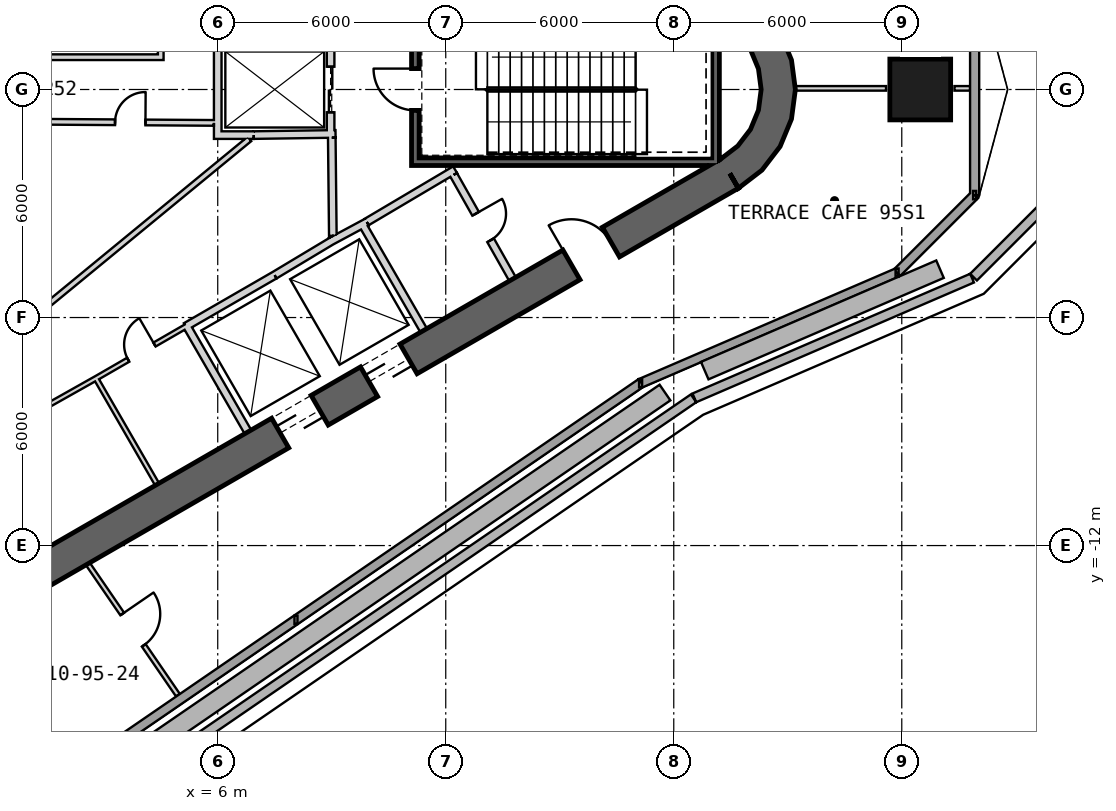
"""IFC4 building model, lengths in metres.
Left out: names, types, materials, properties, quantities, classifications, styles, units other than length and angle.
Written with IfcOpenShell. Run it as: python <this file> out.ifc"""

import sys

from ifc_helpers import new_model, si_unit, direction, frame, frame_2d, origin, origin_2d, place, context, subcontext, project, spatial, polyline, rectangle, outline, extrude, element, fill, save


model = new_model("IFC4")
c1 = context("Model", 3, precision=1e-05, world=origin(), true_north=direction((0.0, 1.0)))
c2 = subcontext(c1, "Body", "Model", "MODEL_VIEW")
j1 = project(units=[si_unit("LENGTHUNIT", "METRE"), si_unit("PLANEANGLEUNIT", "RADIAN")], contexts=[c1])
p1 = place(None, origin())
s1 = spatial("IfcSite", under=j1, at=p1, CompositionType="ELEMENT")
p2 = place(p1, origin())
s2 = spatial("IfcBuilding", under=s1, at=p2, CompositionType="ELEMENT")
p3 = place(p2, frame((0.0, 0.0, 420.3)))
s3 = spatial("IfcBuildingStorey", under=s2, at=p3, CompositionType="ELEMENT", Elevation=420.3)
p4 = place(p3, frame((24.486, 0.0, -0.25), z_axis=(0.0, 0.0, 1.0), x_axis=(1.0, 0.0, 0.0)))
e1 = element("IfcColumn", 1, at=p4, inside=s3, PredefinedType="COLUMN", context=c2, shape_type="SweptSolid", body=[
    extrude(rectangle(XDim=1.6, YDim=1.6, at=origin_2d()), origin(), (0.0, 0.0, 1.0), 5.0),
])
p5 = place(p3, frame((-7.825, -17.97, 0.0), z_axis=(0.0, 0.0, 1.0), x_axis=(0.866028369851, 0.499994862586, 0.0)))
e2 = element("IfcWall", 2, at=p5, inside=s3, PredefinedType="SHEAR", context=c2, shape_type="SweptSolid", body=[
    extrude(rectangle(XDim=31.523, YDim=0.9, at=frame_2d((15.762, 0.0))), origin(), (0.0, 0.0, 1.0), 5.0),
])
p6 = place(p5, frame((17.862, 0.0, 0.0)))
e3 = element("IfcOpeningElement", 3, at=p6, cuts=e2, PredefinedType="OPENING", context=c2, shape_type="SweptSolid", body=[
    extrude(rectangle(XDim=1.2, YDim=2.4, at=frame_2d((0.6, 1.2))), frame((0.0, 0.46, 0.0), z_axis=(0.0, -1.0, 0.0), x_axis=(1.0, 0.0, 0.0)), (0.0, 0.0, 1.0), 0.92),
])
p7 = place(p5, frame((20.562, 0.0, 0.0)))
e4 = element("IfcOpeningElement", 4, at=p7, cuts=e2, PredefinedType="OPENING", context=c2, shape_type="SweptSolid", body=[
    extrude(rectangle(XDim=1.2, YDim=2.4, at=frame_2d((0.6, 1.2))), frame((0.0, 0.46, 0.0), z_axis=(0.0, -1.0, 0.0), x_axis=(1.0, 0.0, 0.0)), (0.0, 0.0, 1.0), 0.92),
])
p8 = place(p5, frame((26.712, 0.0, 0.0)))
e5 = element("IfcOpeningElement", 5, at=p8, cuts=e2, PredefinedType="OPENING", context=c2, shape_type="SweptSolid", body=[
    extrude(rectangle(XDim=1.2, YDim=2.4, at=frame_2d((0.6, 1.2))), frame((0.0, 0.46, 0.0), z_axis=(0.0, -1.0, 0.0), x_axis=(1.0, 0.0, 0.0)), (0.0, 0.0, 1.0), 0.92),
])
p9 = place(p5, frame((3.612, 0.0, 0.0)))
e6 = element("IfcOpeningElement", 6, at=p9, cuts=e2, PredefinedType="OPENING", context=c2, shape_type="SweptSolid", body=[
    extrude(rectangle(XDim=1.2, YDim=2.4, at=frame_2d((0.6, 1.2))), frame((0.0, 0.46, 0.0), z_axis=(0.0, -1.0, 0.0), x_axis=(1.0, 0.0, 0.0)), (0.0, 0.0, 1.0), 0.92),
])
p10 = place(p3, origin())
e7 = element("IfcWall", 7, at=p10, inside=s3, PredefinedType="SHEAR", context=c2, shape_type="SweptSolid", body=[
    extrude(outline(polyline([(19.7, -2.598), (20.321, -2.121), (20.798, -1.5), (21.098, -0.777), (21.2, 0.0), (21.098, 0.777), (20.798, 1.5), (20.321, 2.121), (19.7, 2.598), (19.25, 1.819), (19.685, 1.485), (20.019, 1.05), (20.229, 0.543), (20.3, 0.0), (20.229, -0.543), (20.019, -1.05), (19.685, -1.485), (19.25, -1.819), (19.7, -2.598)])), origin(), (0.0, 0.0, 1.0), 5.0),
])
p11 = place(p3, frame((-1.01, -20.178, 0.0), z_axis=(0.0, 0.0, 1.0), x_axis=(0.824477208683, 0.565895160221, 0.0)))
e8 = element("IfcWall", 8, at=p11, inside=s3, PredefinedType="SOLIDWALL", context=c2, shape_type="SweptSolid", body=[
    extrude(rectangle(XDim=21.999, YDim=0.24, at=frame_2d((11.0, 0.0))), origin(), (0.0, 0.0, 1.0), 4.75),
])
p12 = place(p3, frame((17.127, -7.729, 0.0), z_axis=(0.0, 0.0, 1.0), x_axis=(0.918306180975, 0.395870885497, 0.0)))
e9 = element("IfcWall", 9, at=p12, inside=s3, PredefinedType="SOLIDWALL", context=c2, shape_type="SweptSolid", body=[
    extrude(rectangle(XDim=7.349, YDim=0.24, at=frame_2d((3.675, 0.0))), origin(), (0.0, 0.0, 1.0), 4.75),
])
p13 = place(p3, frame((23.876, -4.82, 0.0), z_axis=(0.0, 0.0, 1.0), x_axis=(0.707106781187, 0.707106781187, 0.0)))
e10 = element("IfcWall", 10, at=p13, inside=s3, PredefinedType="SOLIDWALL", context=c2, shape_type="SweptSolid", body=[
    extrude(rectangle(XDim=2.886, YDim=0.24, at=frame_2d((1.443, 0.0))), origin(), (0.0, 0.0, 1.0), 4.75),
])
p14 = place(p3, frame((25.917, -2.779, 0.0), z_axis=(0.0, 0.0, 1.0), x_axis=(0.0, 1.0, 0.0)))
e11 = element("IfcWall", 11, at=p14, inside=s3, PredefinedType="SOLIDWALL", context=c2, shape_type="SweptSolid", body=[
    extrude(rectangle(XDim=5.558, YDim=0.24, at=frame_2d((2.779, 0.0))), origin(), (0.0, 0.0, 1.0), 4.75),
])
p15 = place(p3, frame((27.958, -2.868, 0.04), z_axis=(0.0, 0.0, 1.0), x_axis=(-0.707106781187, -0.707106781187, 0.0)))
e12 = element("IfcWall", 12, at=p15, inside=s3, PredefinedType="PARAPET", context=c2, shape_type="SweptSolid", body=[
    extrude(rectangle(XDim=2.926, YDim=0.25, at=frame_2d((1.463, 0.0))), origin(), (0.0, 0.0, 1.0), 1.2),
])
p16 = place(p3, frame((25.85, -4.964, 0.04), z_axis=(0.0, 0.0, 1.0), x_axis=(-0.918309857205, -0.395862357594, 0.0)))
e13 = element("IfcWall", 13, at=p16, inside=s3, PredefinedType="PARAPET", context=c2, shape_type="SweptSolid", body=[
    extrude(rectangle(XDim=7.958, YDim=0.25, at=frame_2d((3.979, 0.0))), origin(), (0.0, 0.0, 1.0), 1.2),
])
p17 = place(p3, frame((18.521, -8.125, 0.04), z_axis=(0.0, 0.0, 1.0), x_axis=(-0.82448023265, -0.565890754447, 0.0)))
e14 = element("IfcWall", 14, at=p17, inside=s3, PredefinedType="PARAPET", context=c2, shape_type="SweptSolid", body=[
    extrude(rectangle(XDim=24.007, YDim=0.25, at=frame_2d((12.003, 0.0))), origin(), (0.0, 0.0, 1.0), 1.2),
])
p18 = place(p3, frame((25.006, -4.728, 0.04), z_axis=(0.0, 0.0, 1.0), x_axis=(-0.918311377088, -0.395858831795, 0.0)))
e15 = element("IfcWall", 15, at=p18, inside=s3, PredefinedType="PARAPET", context=c2, shape_type="SweptSolid", body=[
    extrude(rectangle(XDim=6.742, YDim=0.5, at=frame_2d((3.371, 0.0))), origin(), (0.0, 0.0, 1.0), 0.6),
])
p19 = place(p3, frame((17.769, -7.974, 0.04), z_axis=(0.0, 0.0, 1.0), x_axis=(-0.824477548628, -0.565894664941, 0.0)))
e16 = element("IfcWall", 16, at=p19, inside=s3, PredefinedType="PARAPET", context=c2, shape_type="SweptSolid", body=[
    extrude(rectangle(XDim=22.831, YDim=0.5, at=frame_2d((11.416, 0.0))), origin(), (0.0, 0.0, 1.0), 0.6),
])
p20 = place(p3, frame((6.795, -9.01, 0.0), z_axis=(0.0, 0.0, 1.0), x_axis=(-0.499984717929, 0.866034226713, 0.0)))
e17 = element("IfcWall", 17, at=p20, inside=s3, PredefinedType="PLUMBINGWALL", context=c2, shape_type="SweptSolid", body=[
    extrude(rectangle(XDim=3.25, YDim=0.2, at=frame_2d((1.625, 0.0))), origin(), (0.0, 0.0, 1.0), 4.75),
])
p21 = place(p3, frame((5.159, -6.236, 0.0), z_axis=(0.0, 0.0, 1.0), x_axis=(0.866036505625, 0.499980770555, 0.0)))
e18 = element("IfcWall", 18, at=p21, inside=s3, PredefinedType="PLUMBINGWALL", context=c2, shape_type="SweptSolid", body=[
    extrude(rectangle(XDim=2.7, YDim=0.2, at=frame_2d((1.35, 0.0))), origin(), (0.0, 0.0, 1.0), 4.75),
])
p22 = place(p3, frame((9.795, -3.525, 0.0), z_axis=(0.0, 0.0, 1.0), x_axis=(0.499984717929, -0.866034226713, 0.0)))
e19 = element("IfcWall", 19, at=p22, inside=s3, PredefinedType="PLUMBINGWALL", context=c2, shape_type="SweptSolid", body=[
    extrude(rectangle(XDim=3.25, YDim=0.2, at=frame_2d((1.625, 0.0))), origin(), (0.0, 0.0, 1.0), 4.75),
])
p23 = place(p3, frame((8.974, -3.999, 0.0), z_axis=(0.0, 0.0, 1.0), x_axis=(0.880907015104, 0.473289373154, 0.0)))
e20 = element("IfcWall", 20, at=p23, inside=s3, PredefinedType="PLUMBINGWALL", context=c2, shape_type="SweptSolid", body=[
    extrude(rectangle(XDim=1.078, YDim=0.2, at=frame_2d((0.539, 0.0))), origin(), (0.0, 0.0, 1.0), 4.75),
])
p24 = place(p3, frame((7.497, -4.886, 0.0), z_axis=(0.0, 0.0, 1.0), x_axis=(0.857516281273, 0.51445682749, 0.0)))
e21 = element("IfcWall", 21, at=p24, inside=s3, PredefinedType="PLUMBINGWALL", context=c2, shape_type="SweptSolid", body=[
    extrude(rectangle(XDim=1.845, YDim=0.2, at=frame_2d((0.922, 0.0))), origin(), (0.0, 0.0, 1.0), 4.75),
])
p25 = place(p3, frame((19.1, -2.0, -0.25), z_axis=(0.0, 0.0, 1.0), x_axis=(0.0, 1.0, 0.0)))
e22 = element("IfcWall", 22, at=p25, inside=s3, PredefinedType="SHEAR", context=c2, shape_type="SweptSolid", body=[
    extrude(rectangle(XDim=3.8, YDim=0.2, at=frame_2d((1.9, 0.0))), origin(), (0.0, 0.0, 1.0), 5.0),
])
p26 = place(p3, frame((11.1, -1.9, -0.25), z_axis=(0.0, 0.0, 1.0), x_axis=(1.0, 0.0, 0.0)))
e23 = element("IfcWall", 23, at=p26, inside=s3, PredefinedType="SHEAR", context=c2, shape_type="SweptSolid", body=[
    extrude(rectangle(XDim=7.9, YDim=0.2, at=frame_2d((3.95, 0.0))), origin(), (0.0, 0.0, 1.0), 5.0),
])
p27 = place(p3, frame((11.2, -1.8, -0.25), z_axis=(0.0, 0.0, 1.0), x_axis=(0.0, 1.0, 0.0)))
e24 = element("IfcWall", 24, at=p27, inside=s3, PredefinedType="SHEAR", context=c2, shape_type="SweptSolid", body=[
    extrude(rectangle(XDim=3.6, YDim=0.2, at=frame_2d((1.8, 0.0))), origin(), (0.0, 0.0, 1.0), 5.0),
])
p28 = place(p27, frame((1.25, 0.0, 0.25)))
e25 = element("IfcOpeningElement", 25, at=p28, cuts=e24, PredefinedType="OPENING", context=c2, shape_type="SweptSolid", body=[
    extrude(rectangle(XDim=1.1, YDim=2.1, at=frame_2d((0.55, 1.05))), frame((0.0, 0.11, 0.0), z_axis=(0.0, -1.0, 0.0), x_axis=(1.0, 0.0, 0.0)), (0.0, 0.0, 1.0), 0.22),
])
p29 = place(p3, frame((8.97, 1.2, 0.0), z_axis=(0.0, 0.0, 1.0), x_axis=(0.0, -1.0, 0.0)))
e26 = element("IfcWall", 26, at=p29, inside=s3, PredefinedType="PLUMBINGWALL", context=c2, shape_type="SweptSolid", body=[
    extrude(rectangle(XDim=2.4, YDim=0.2, at=frame_2d((1.2, 0.0))), origin(), (0.0, 0.0, 1.0), 4.75),
])
p30 = place(p29, frame((0.6, 0.0, 0.0)))
e27 = element("IfcOpeningElement", 27, at=p30, cuts=e26, PredefinedType="OPENING", context=c2, shape_type="SweptSolid", body=[
    extrude(rectangle(XDim=1.2, YDim=2.4, at=frame_2d((0.6, 1.2))), frame((0.0, 0.11, 0.0), z_axis=(0.0, -1.0, 0.0), x_axis=(1.0, 0.0, 0.0)), (0.0, 0.0, 1.0), 0.22),
])
p31 = place(p3, frame((6.949, -1.2, 0.0), z_axis=(0.0, 0.0, 1.0), x_axis=(-1.0, 0.0, 0.0)))
e28 = element("IfcWall", 28, at=p31, inside=s3, PredefinedType="PLUMBINGWALL", context=c2, shape_type="SweptSolid", body=[
    extrude(rectangle(XDim=1.049, YDim=0.2, at=frame_2d((0.524, 0.0))), origin(), (0.0, 0.0, 1.0), 4.75),
])
p32 = place(p3, frame((6.0, -1.1, 0.0), z_axis=(0.0, 0.0, 1.0), x_axis=(0.0, 1.0, 0.0)))
e29 = element("IfcWall", 29, at=p32, inside=s3, PredefinedType="PLUMBINGWALL", context=c2, shape_type="SweptSolid", body=[
    extrude(rectangle(XDim=2.4, YDim=0.2, at=frame_2d((1.2, 0.0))), origin(), (0.0, 0.0, 1.0), 4.75),
])
p33 = place(p3, frame((9.1, -1.168, 0.0), z_axis=(0.0, 0.0, 1.0), x_axis=(-0.999896137355, -0.014412303875, 0.0)))
e30 = element("IfcWall", 30, at=p33, inside=s3, PredefinedType="PLUMBINGWALL", context=c2, shape_type="SweptSolid", body=[
    extrude(rectangle(XDim=2.151, YDim=0.2, at=frame_2d((1.076, 0.0))), origin(), (0.0, 0.0, 1.0), 4.75),
])
p34 = place(p3, frame((4.405, -10.389, 0.0), z_axis=(0.0, 0.0, 1.0), x_axis=(-0.500017246033, 0.866015446554, 0.0)))
e31 = element("IfcWall", 31, at=p34, inside=s3, PredefinedType="PARTITIONING", context=c2, shape_type="SweptSolid", body=[
    extrude(rectangle(XDim=3.25, YDim=0.12, at=frame_2d((1.625, 0.0))), origin(), (0.0, 0.0, 1.0), 4.75),
])
p35 = place(p3, frame((0.493, -8.896, 0.0), z_axis=(0.0, 0.0, 1.0), x_axis=(0.871414386141, 0.490547620141, 0.0)))
e32 = element("IfcWall", 32, at=p35, inside=s3, PredefinedType="PARTITIONING", context=c2, shape_type="SweptSolid", body=[
    extrude(rectangle(XDim=2.671, YDim=0.12, at=frame_2d((1.335, 0.0))), origin(), (0.0, 0.0, 1.0), 4.75),
])
p36 = place(p3, frame((2.821, -7.586, 0.0), z_axis=(0.0, 0.0, 1.0), x_axis=(0.866019956843, 0.50000943426, 0.0)))
e33 = element("IfcWall", 33, at=p36, inside=s3, PredefinedType="PARTITIONING", context=c2, shape_type="SweptSolid", body=[
    extrude(rectangle(XDim=2.7, YDim=0.12, at=frame_2d((1.35, 0.0))), origin(), (0.0, 0.0, 1.0), 4.75),
])
p37 = place(p36, frame((0.95, 0.0, 0.0)))
e34 = element("IfcOpeningElement", 34, at=p37, cuts=e33, PredefinedType="OPENING", context=c2, shape_type="SweptSolid", body=[
    extrude(rectangle(XDim=0.8, YDim=2.1, at=frame_2d((0.4, 1.05))), frame((0.0, 0.07, 0.0), z_axis=(0.0, -1.0, 0.0), x_axis=(1.0, 0.0, 0.0)), (0.0, 0.0, 1.0), 0.14),
])
p38 = place(p3, frame((12.245, -2.109, 0.0), z_axis=(0.0, 0.0, 1.0), x_axis=(-0.860414880418, -0.509594185166, 0.0)))
e35 = element("IfcWall", 35, at=p38, inside=s3, PredefinedType="PARTITIONING", context=c2, shape_type="SweptSolid", body=[
    extrude(rectangle(XDim=2.7, YDim=0.2, at=frame_2d((1.35, 0.0))), origin(), (0.0, 0.0, 1.0), 4.75),
])
p39 = place(p3, frame((13.758, -4.99, 0.0), z_axis=(0.0, 0.0, 1.0), x_axis=(-0.491993409184, 0.87059892334, 0.0)))
e36 = element("IfcWall", 36, at=p39, inside=s3, PredefinedType="PARTITIONING", context=c2, shape_type="SweptSolid", body=[
    extrude(rectangle(XDim=3.15, YDim=0.2, at=frame_2d((1.575, 0.0))), origin(), (0.0, 0.0, 1.0), 4.75),
])
p40 = place(p39, frame((1.175, 0.0, 0.0)))
e37 = element("IfcOpeningElement", 37, at=p40, cuts=e36, PredefinedType="OPENING", context=c2, shape_type="SweptSolid", body=[
    extrude(rectangle(XDim=0.8, YDim=2.1, at=frame_2d((0.4, 1.05))), frame((0.0, 0.11, 0.0), z_axis=(0.0, -1.0, 0.0), x_axis=(1.0, 0.0, 0.0)), (0.0, 0.0, 1.0), 0.22),
])
p41 = place(p3, frame((9.029, -3.851, 0.0), z_axis=(0.0, 0.0, 1.0), x_axis=(-0.010784614026, 0.999941844359, 0.0)))
e38 = element("IfcWall", 38, at=p41, inside=s3, PredefinedType="PARTITIONING", context=c2, shape_type="SweptSolid", body=[
    extrude(rectangle(XDim=2.581, YDim=0.2, at=frame_2d((1.291, 0.0))), origin(), (0.0, 0.0, 1.0), 4.75),
])
p42 = place(p3, frame((6.834, -1.302, 0.0), z_axis=(0.0, 0.0, 1.0), x_axis=(-0.772564687607, -0.634936062499, 0.0)))
e39 = element("IfcWall", 39, at=p42, inside=s3, PredefinedType="PLUMBINGWALL", context=c2, shape_type="SweptSolid", body=[
    extrude(rectangle(XDim=10.457, YDim=0.15, at=frame_2d((5.229, 0.0))), origin(), (0.0, 0.0, 1.0), 4.75),
])
p43 = place(p3, frame((5.9, -0.879, 0.0), z_axis=(0.0, 0.0, 1.0), x_axis=(-0.999978605844, 0.006541242613, 0.0)))
e40 = element("IfcWall", 40, at=p43, inside=s3, PredefinedType="PLUMBINGWALL", context=c2, shape_type="SweptSolid", body=[
    extrude(rectangle(XDim=4.404, YDim=0.15, at=frame_2d((2.202, 0.0))), origin(), (0.0, 0.0, 1.0), 4.75),
])
p44 = place(p43, frame((1.802, 0.0, 0.0)))
e41 = element("IfcOpeningElement", 41, at=p44, cuts=e40, PredefinedType="OPENING", context=c2, shape_type="SweptSolid", body=[
    extrude(rectangle(XDim=0.8, YDim=2.1, at=frame_2d((0.4, 1.05))), frame((0.0, 0.085, 0.0), z_axis=(0.0, -1.0, 0.0), x_axis=(1.0, 0.0, 0.0)), (0.0, 0.0, 1.0), 0.17),
])
p45 = place(p3, frame((4.5, 0.775, 0.0), z_axis=(0.0, 0.0, 1.0), x_axis=(0.0, 1.0, 0.0)))
e42 = element("IfcWall", 42, at=p45, inside=s3, PredefinedType="PLUMBINGWALL", context=c2, shape_type="SweptSolid", body=[
    extrude(rectangle(XDim=1.85, YDim=0.15, at=frame_2d((0.925, 0.0))), origin(), (0.0, 0.0, 1.0), 4.75),
])
p46 = place(p3, frame((1.342, 0.85, 0.0), z_axis=(0.0, 0.0, 1.0), x_axis=(1.0, 0.0, 0.0)))
e43 = element("IfcWall", 43, at=p46, inside=s3, PredefinedType="PLUMBINGWALL", context=c2, shape_type="SweptSolid", body=[
    extrude(rectangle(XDim=3.083, YDim=0.15, at=frame_2d((1.542, 0.0))), origin(), (0.0, 0.0, 1.0), 4.75),
])
p47 = place(p3, frame((23.586, 0.03, 0.0), z_axis=(0.0, 0.0, 1.0), x_axis=(-1.0, 0.0, 0.0)))
e44 = element("IfcWall", 44, at=p47, inside=s3, PredefinedType="PARTITIONING", context=c2, shape_type="SweptSolid", body=[
    extrude(rectangle(XDim=2.54, YDim=0.12, at=frame_2d((1.27, 0.0))), origin(), (0.0, 0.0, 1.0), 2.52),
])
p48 = place(p3, frame((25.797, 0.03, 0.0), z_axis=(0.0, 0.0, 1.0), x_axis=(-1.0, 0.0, 0.0)))
e45 = element("IfcWall", 45, at=p48, inside=s3, PredefinedType="PARTITIONING", context=c2, shape_type="SweptSolid", body=[
    extrude(rectangle(XDim=0.411, YDim=0.12, at=frame_2d((0.206, 0.0))), origin(), (0.0, 0.0, 1.0), 4.75),
])
p49 = place(p3, frame((2.581, -12.481, 0.0), z_axis=(0.0, 0.0, 1.0), x_axis=(0.565895333032, -0.824477090071, 0.0)))
e46 = element("IfcWall", 46, at=p49, inside=s3, PredefinedType="PARTITIONING", context=c2, shape_type="SweptSolid", body=[
    extrude(rectangle(XDim=4.188, YDim=0.12, at=frame_2d((2.094, 0.0))), origin(), (0.0, 0.0, 1.0), 4.75),
])
p50 = place(p49, frame((1.6, 0.0, 0.0)))
e47 = element("IfcOpeningElement", 47, at=p50, cuts=e46, PredefinedType="OPENING", context=c2, shape_type="SweptSolid", body=[
    extrude(rectangle(XDim=1.0, YDim=2.1, at=frame_2d((0.5, 1.05))), frame((0.0, 0.07, 0.0), z_axis=(0.0, -1.0, 0.0), x_axis=(1.0, 0.0, 0.0)), (0.0, 0.0, 1.0), 0.14),
])
p51 = place(p28, origin())
e48 = element("IfcDoor", 48, at=p51, inside=s3, OperationType="SINGLE_SWING_RIGHT", PredefinedType="USERDEFINED", context=c2, shape_type="SweptSolid", body=[
    extrude(rectangle(XDim=1.1, YDim=2.1, at=frame_2d((0.55, 1.05))), frame((0.0, 0.025, 0.0), z_axis=(0.0, -1.0, 0.0), x_axis=(1.0, 0.0, 0.0)), (0.0, 0.0, 1.0), 0.05),
])
fill(e25, e48)
p52 = place(p30, origin())
e49 = element("IfcDoor", 49, at=p52, inside=s3, OperationType="SLIDING_TO_LEFT", PredefinedType="USERDEFINED", context=c2, shape_type="SweptSolid", body=[
    extrude(rectangle(XDim=1.2, YDim=2.4, at=frame_2d((0.6, 1.2))), frame((0.0, 0.025, 0.0), z_axis=(0.0, -1.0, 0.0), x_axis=(1.0, 0.0, 0.0)), (0.0, 0.0, 1.0), 0.05),
])
fill(e27, e49)
p53 = place(p44, origin())
e50 = element("IfcDoor", 50, at=p53, inside=s3, OperationType="SINGLE_SWING_LEFT", PredefinedType="USERDEFINED", context=c2, shape_type="SweptSolid", body=[
    extrude(rectangle(XDim=0.8, YDim=2.1, at=frame_2d((0.4, 1.05))), frame((0.0, 0.025, 0.0), z_axis=(0.0, -1.0, 0.0), x_axis=(1.0, 0.0, 0.0)), (0.0, 0.0, 1.0), 0.05),
])
fill(e41, e50)
p54 = place(p37, origin())
e51 = element("IfcDoor", 51, at=p54, inside=s3, OperationType="SINGLE_SWING_RIGHT", PredefinedType="USERDEFINED", context=c2, shape_type="SweptSolid", body=[
    extrude(rectangle(XDim=0.8, YDim=2.1, at=frame_2d((0.4, 1.05))), frame((0.0, 0.025, 0.0), z_axis=(0.0, -1.0, 0.0), x_axis=(1.0, 0.0, 0.0)), (0.0, 0.0, 1.0), 0.05),
])
fill(e34, e51)
p55 = place(p40, origin())
e52 = element("IfcDoor", 52, at=p55, inside=s3, OperationType="SINGLE_SWING_RIGHT", PredefinedType="USERDEFINED", context=c2, shape_type="SweptSolid", body=[
    extrude(rectangle(XDim=0.8, YDim=2.1, at=frame_2d((0.4, 1.05))), frame((0.0, 0.025, 0.0), z_axis=(0.0, -1.0, 0.0), x_axis=(1.0, 0.0, 0.0)), (0.0, 0.0, 1.0), 0.05),
])
fill(e37, e52)
p56 = place(p50, origin())
e53 = element("IfcDoor", 53, at=p56, inside=s3, OperationType="SINGLE_SWING_LEFT", PredefinedType="NOTDEFINED", context=c2, shape_type="SweptSolid", body=[
    extrude(rectangle(XDim=1.0, YDim=2.1, at=frame_2d((0.5, 1.05))), frame((0.0, 0.025, 0.0), z_axis=(0.0, -1.0, 0.0), x_axis=(1.0, 0.0, 0.0)), (0.0, 0.0, 1.0), 0.05),
])
fill(e47, e53)
p57 = place(p6, origin())
e54 = element("IfcDoor", 54, at=p57, inside=s3, OperationType="SLIDING_TO_LEFT", PredefinedType="USERDEFINED", context=c2, shape_type="SweptSolid", body=[
    extrude(rectangle(XDim=1.2, YDim=2.4, at=frame_2d((0.6, 1.2))), frame((0.0, 0.025, 0.0), z_axis=(0.0, -1.0, 0.0), x_axis=(1.0, 0.0, 0.0)), (0.0, 0.0, 1.0), 0.05),
])
fill(e3, e54)
p58 = place(p7, origin())
e55 = element("IfcDoor", 55, at=p58, inside=s3, OperationType="SLIDING_TO_LEFT", PredefinedType="USERDEFINED", context=c2, shape_type="SweptSolid", body=[
    extrude(rectangle(XDim=1.2, YDim=2.4, at=frame_2d((0.6, 1.2))), frame((0.0, 0.025, 0.0), z_axis=(0.0, -1.0, 0.0), x_axis=(1.0, 0.0, 0.0)), (0.0, 0.0, 1.0), 0.05),
])
fill(e4, e55)
p59 = place(p8, origin())
e56 = element("IfcDoor", 56, at=p59, inside=s3, OperationType="SINGLE_SWING_LEFT", PredefinedType="USERDEFINED", context=c2, shape_type="SweptSolid", body=[
    extrude(rectangle(XDim=1.2, YDim=2.4, at=frame_2d((0.6, 1.2))), frame((0.0, 0.025, 0.0), z_axis=(0.0, -1.0, 0.0), x_axis=(1.0, 0.0, 0.0)), (0.0, 0.0, 1.0), 0.05),
])
fill(e5, e56)
save(model, sys.argv[1])
